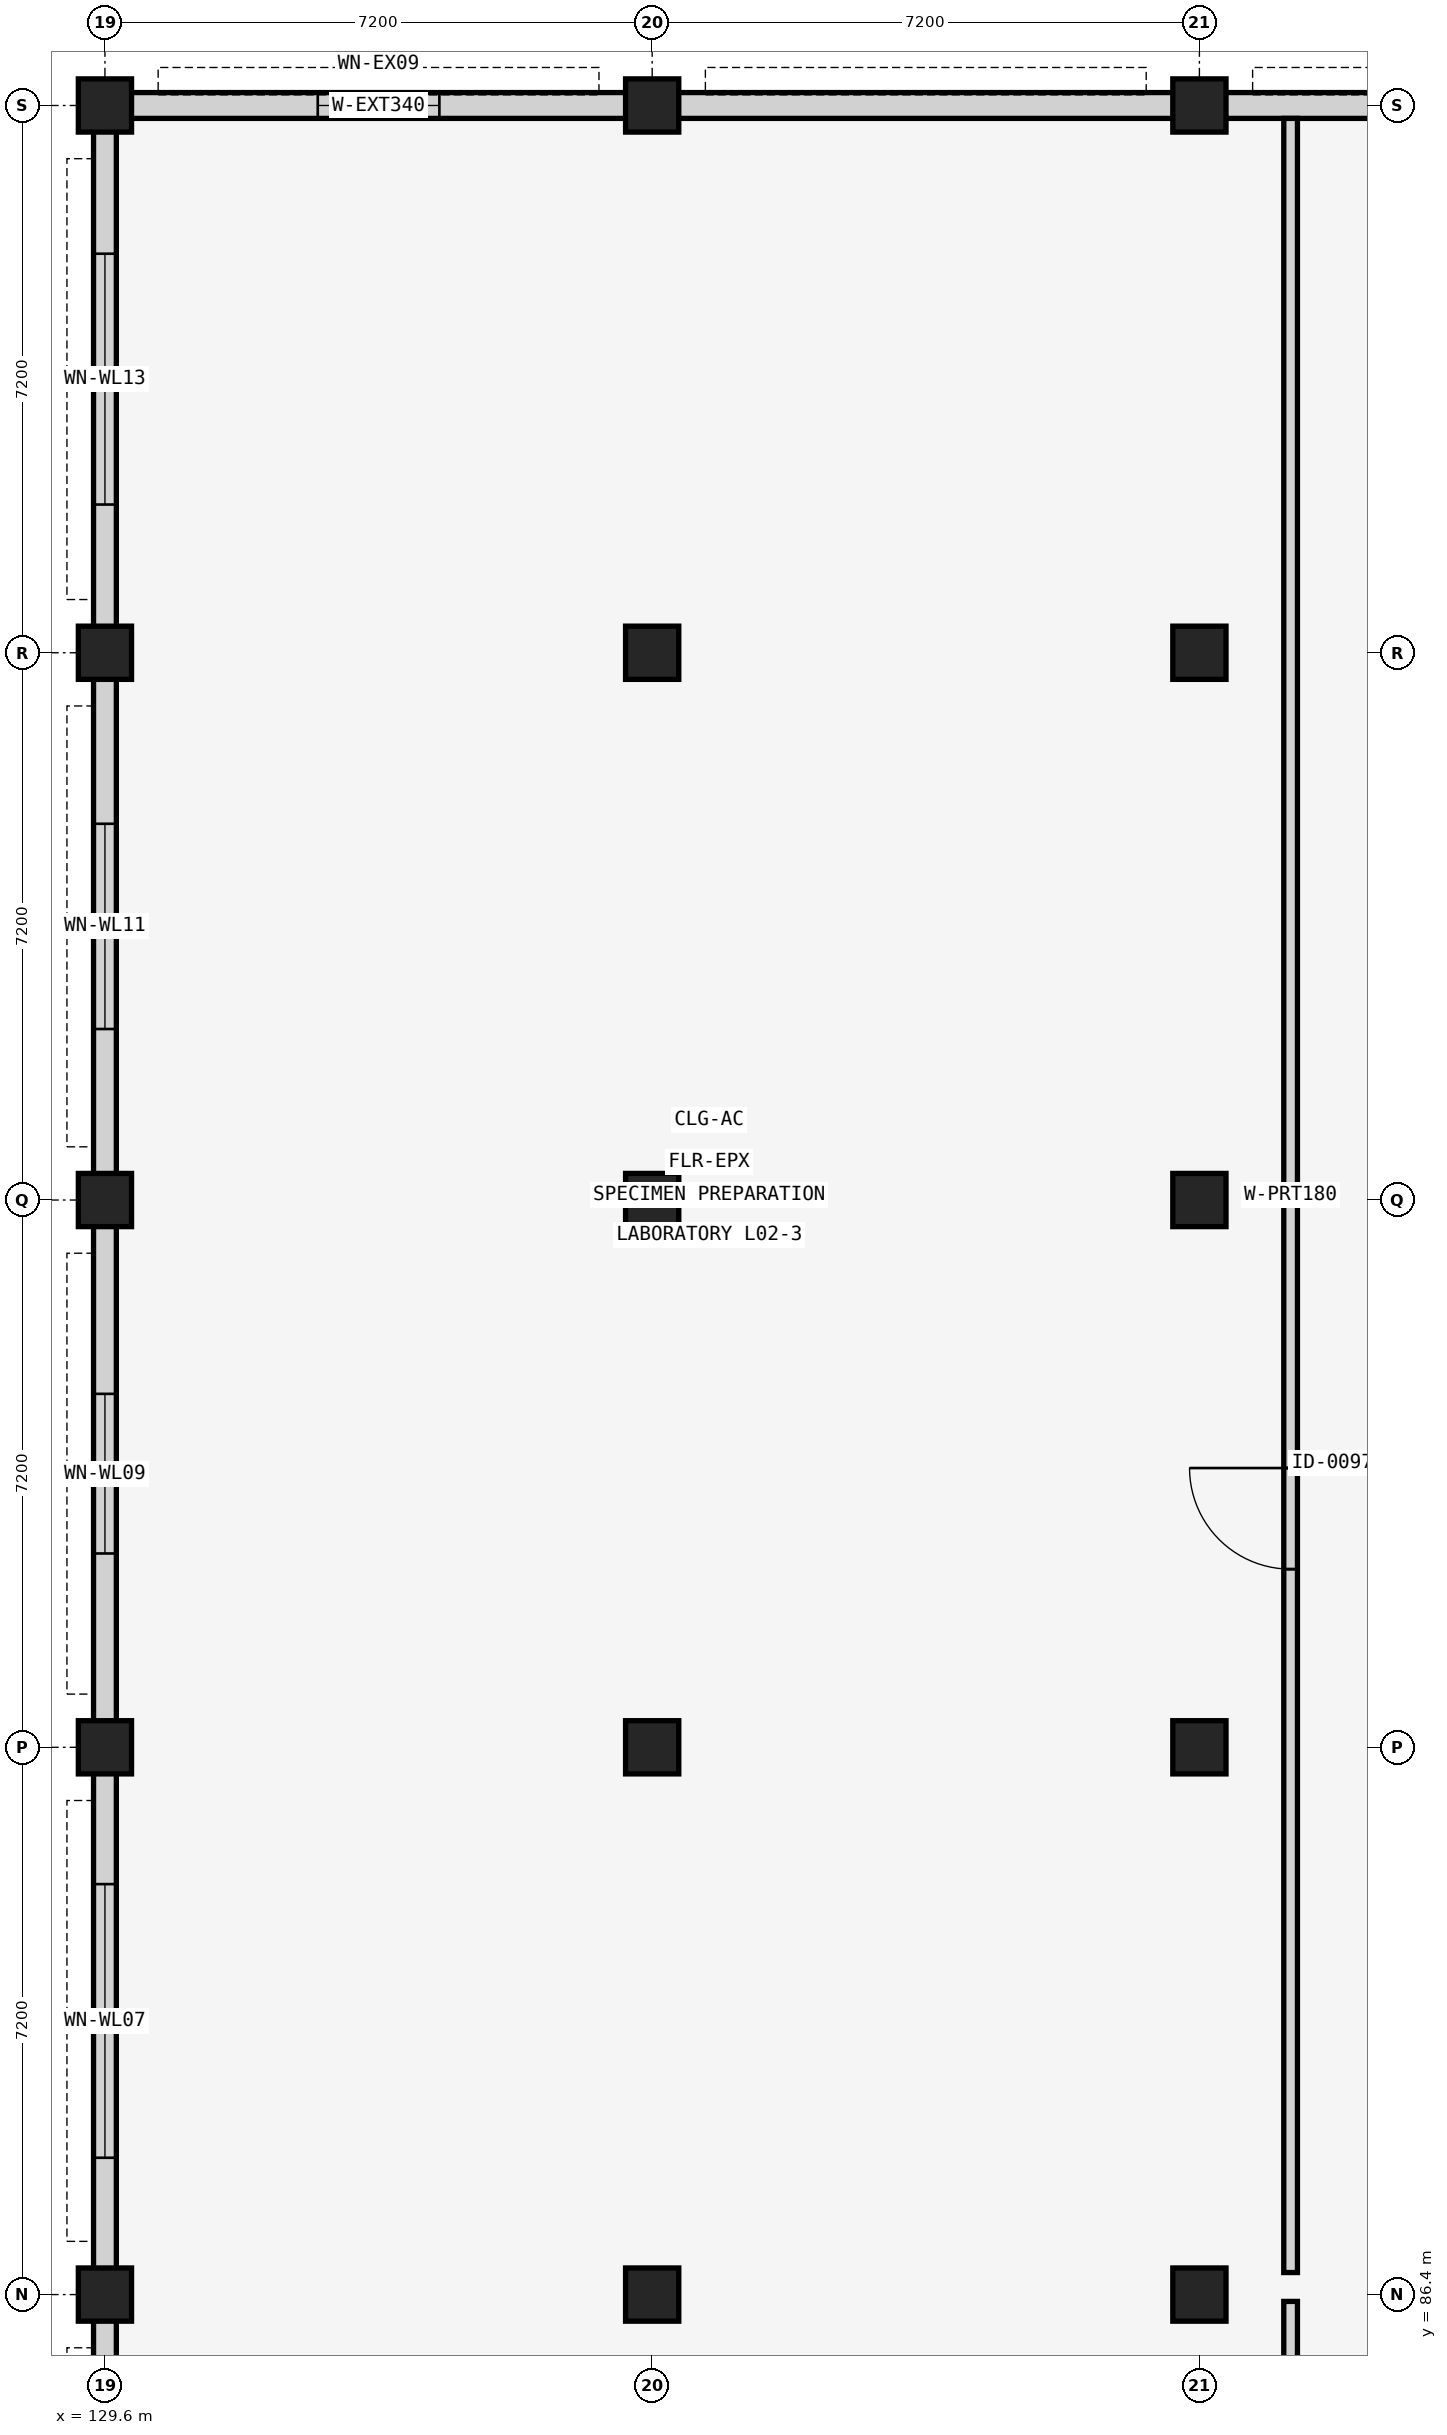
"""IFC4 building model, lengths in metres.
Left out: names, types, materials, properties, quantities, classifications, styles, units other than length and angle.
Written with IfcOpenShell. Run it as: python <this file> out.ifc"""

import sys

from ifc_helpers import new_model, si_unit, direction, frame, frame_2d, origin, origin_2d, place, context, subcontext, project, spatial, rectangle, extrude, element, fill, save


model = new_model("IFC4")
c1 = context("Model", 3, precision=1e-05, world=origin(), true_north=direction((0.0, 1.0)))
c2 = subcontext(c1, "Body", "Model", "MODEL_VIEW")
j1 = project(units=[si_unit("LENGTHUNIT", "METRE"), si_unit("PLANEANGLEUNIT", "RADIAN")], contexts=[c1])
p1 = place(None, origin())
s1 = spatial("IfcSite", under=j1, at=p1, CompositionType="ELEMENT")
p2 = place(p1, origin())
s2 = spatial("IfcBuilding", under=s1, at=p2, CompositionType="ELEMENT")
p3 = place(p2, frame((0.0, 0.0, 8.96)))
s3 = spatial("IfcBuildingStorey", under=s2, at=p3, CompositionType="ELEMENT", Elevation=8.96)
for number, where, z_axis, x_axis in (
    (1, (129.6, 86.4, 0.0), (0.0, 0.0, 1.0), (1.0, 0.0, 0.0)),
    (2, (129.6, 93.6, 0.0), (0.0, 0.0, 1.0), (1.0, 0.0, 0.0)),
    (3, (129.6, 100.8, 0.0), (0.0, 0.0, 1.0), (1.0, 0.0, 0.0)),
    (4, (129.6, 108.0, 0.0), (0.0, 0.0, 1.0), (1.0, 0.0, 0.0)),
    (5, (129.6, 115.2, 0.0), (0.0, 0.0, 1.0), (1.0, 0.0, 0.0)),
    (6, (136.8, 86.4, 0.0), (0.0, 0.0, 1.0), (1.0, 0.0, 0.0)),
    (7, (136.8, 93.6, 0.0), (0.0, 0.0, 1.0), (1.0, 0.0, 0.0)),
    (8, (136.8, 100.8, 0.0), (0.0, 0.0, 1.0), (1.0, 0.0, 0.0)),
    (9, (136.8, 108.0, 0.0), (0.0, 0.0, 1.0), (1.0, 0.0, 0.0)),
    (10, (136.8, 115.2, 0.0), (0.0, 0.0, 1.0), (1.0, 0.0, 0.0)),
    (11, (144.0, 86.4, 0.0), (0.0, 0.0, 1.0), (1.0, 0.0, 0.0)),
    (12, (144.0, 93.6, 0.0), (0.0, 0.0, 1.0), (1.0, 0.0, 0.0)),
    (13, (144.0, 100.8, 0.0), (0.0, 0.0, 1.0), (1.0, 0.0, 0.0)),
    (14, (144.0, 108.0, 0.0), (0.0, 0.0, 1.0), (1.0, 0.0, 0.0)),
    (15, (144.0, 115.2, 0.0), (0.0, 0.0, 1.0), (1.0, 0.0, 0.0)),
):
    element("IfcColumn", number, at=place(p3, frame(where, z_axis=z_axis, x_axis=x_axis)), inside=s3, PredefinedType="COLUMN", context=c2, shape_type="SweptSolid", body=[
        extrude(rectangle(XDim=0.7, YDim=0.7, at=origin_2d()), origin(), (0.0, 0.0, 1.0), 4.16),
    ])
p4 = place(p3, frame((129.94, 115.2, 0.0), z_axis=(0.0, 0.0, 1.0), x_axis=(1.0, 0.0, 0.0)))
e16 = element("IfcWall", 16, at=p4, inside=s3, PredefinedType="SOLIDWALL", context=c2, shape_type="SweptSolid", body=[
    extrude(rectangle(XDim=6.52, YDim=0.34, at=frame_2d((3.26, 0.0))), origin(), (0.0, 0.0, 1.0), 3.21),
])
p5 = place(p4, frame((2.46, 0.0, 0.95)))
e17 = element("IfcOpeningElement", 17, at=p5, cuts=e16, PredefinedType="OPENING", context=c2, shape_type="SweptSolid", body=[
    extrude(rectangle(XDim=1.6, YDim=1.7, at=frame_2d((0.8, 0.85))), frame((0.0, 0.18, 0.0), z_axis=(0.0, -1.0, 0.0), x_axis=(1.0, 0.0, 0.0)), (0.0, 0.0, 1.0), 0.36),
])
p6 = place(p3, frame((137.14, 115.2, 0.0), z_axis=(0.0, 0.0, 1.0), x_axis=(1.0, 0.0, 0.0)))
e18 = element("IfcWall", 18, at=p6, inside=s3, PredefinedType="SOLIDWALL", context=c2, shape_type="SweptSolid", body=[
    extrude(rectangle(XDim=6.52, YDim=0.34, at=frame_2d((3.26, 0.0))), origin(), (0.0, 0.0, 1.0), 3.21),
])
p7 = place(p3, frame((144.34, 115.2, 0.0), z_axis=(0.0, 0.0, 1.0), x_axis=(1.0, 0.0, 0.0)))
e19 = element("IfcWall", 19, at=p7, inside=s3, PredefinedType="SOLIDWALL", context=c2, shape_type="SweptSolid", body=[
    extrude(rectangle(XDim=6.52, YDim=0.34, at=frame_2d((3.26, 0.0))), origin(), (0.0, 0.0, 1.0), 3.21),
])
p8 = place(p7, frame((2.31, 0.0, 0.95)))
e20 = element("IfcOpeningElement", 20, at=p8, cuts=e19, PredefinedType="OPENING", context=c2, shape_type="SweptSolid", body=[
    extrude(rectangle(XDim=1.9, YDim=1.7, at=frame_2d((0.95, 0.85))), frame((0.0, 0.18, 0.0), z_axis=(0.0, -1.0, 0.0), x_axis=(1.0, 0.0, 0.0)), (0.0, 0.0, 1.0), 0.36),
])
p9 = place(p3, frame((129.6, 79.54, 0.0), z_axis=(0.0, 0.0, 1.0), x_axis=(0.0, 1.0, 0.0)))
e21 = element("IfcWall", 21, at=p9, inside=s3, PredefinedType="SOLIDWALL", context=c2, shape_type="SweptSolid", body=[
    extrude(rectangle(XDim=6.52, YDim=0.3, at=frame_2d((3.26, 0.0))), origin(), (0.0, 0.0, 1.0), 3.21),
])
p10 = place(p9, frame((1.76, 0.0, 0.95)))
e22 = element("IfcOpeningElement", 22, at=p10, cuts=e21, PredefinedType="OPENING", context=c2, shape_type="SweptSolid", body=[
    extrude(rectangle(XDim=3.0, YDim=2.1, at=frame_2d((1.5, 1.05))), frame((0.0, 0.16, 0.0), z_axis=(0.0, -1.0, 0.0), x_axis=(1.0, 0.0, 0.0)), (0.0, 0.0, 1.0), 0.32),
])
p11 = place(p3, frame((129.6, 86.74, 0.0), z_axis=(0.0, 0.0, 1.0), x_axis=(0.0, 1.0, 0.0)))
e23 = element("IfcWall", 23, at=p11, inside=s3, PredefinedType="SOLIDWALL", context=c2, shape_type="SweptSolid", body=[
    extrude(rectangle(XDim=6.52, YDim=0.3, at=frame_2d((3.26, 0.0))), origin(), (0.0, 0.0, 1.0), 3.21),
])
p12 = place(p11, frame((1.46, 0.0, 0.95)))
e24 = element("IfcOpeningElement", 24, at=p12, cuts=e23, PredefinedType="OPENING", context=c2, shape_type="SweptSolid", body=[
    extrude(rectangle(XDim=3.6, YDim=2.1, at=frame_2d((1.8, 1.05))), frame((0.0, 0.16, 0.0), z_axis=(0.0, -1.0, 0.0), x_axis=(1.0, 0.0, 0.0)), (0.0, 0.0, 1.0), 0.32),
])
p13 = place(p3, frame((129.6, 93.94, 0.0), z_axis=(0.0, 0.0, 1.0), x_axis=(0.0, 1.0, 0.0)))
e25 = element("IfcWall", 25, at=p13, inside=s3, PredefinedType="SOLIDWALL", context=c2, shape_type="SweptSolid", body=[
    extrude(rectangle(XDim=6.52, YDim=0.3, at=frame_2d((3.26, 0.0))), origin(), (0.0, 0.0, 1.0), 3.21),
])
p14 = place(p13, frame((2.21, 0.0, 0.95)))
e26 = element("IfcOpeningElement", 26, at=p14, cuts=e25, PredefinedType="OPENING", context=c2, shape_type="SweptSolid", body=[
    extrude(rectangle(XDim=2.1, YDim=1.8, at=frame_2d((1.05, 0.9))), frame((0.0, 0.16, 0.0), z_axis=(0.0, -1.0, 0.0), x_axis=(1.0, 0.0, 0.0)), (0.0, 0.0, 1.0), 0.32),
])
p15 = place(p3, frame((129.6, 101.14, 0.0), z_axis=(0.0, 0.0, 1.0), x_axis=(0.0, 1.0, 0.0)))
e27 = element("IfcWall", 27, at=p15, inside=s3, PredefinedType="SOLIDWALL", context=c2, shape_type="SweptSolid", body=[
    extrude(rectangle(XDim=6.52, YDim=0.3, at=frame_2d((3.26, 0.0))), origin(), (0.0, 0.0, 1.0), 3.21),
])
p16 = place(p15, frame((1.91, 0.0, 0.95)))
e28 = element("IfcOpeningElement", 28, at=p16, cuts=e27, PredefinedType="OPENING", context=c2, shape_type="SweptSolid", body=[
    extrude(rectangle(XDim=2.7, YDim=1.8, at=frame_2d((1.35, 0.9))), frame((0.0, 0.16, 0.0), z_axis=(0.0, -1.0, 0.0), x_axis=(1.0, 0.0, 0.0)), (0.0, 0.0, 1.0), 0.32),
])
p17 = place(p3, frame((129.6, 108.34, 0.0), z_axis=(0.0, 0.0, 1.0), x_axis=(0.0, 1.0, 0.0)))
e29 = element("IfcWall", 29, at=p17, inside=s3, PredefinedType="SOLIDWALL", context=c2, shape_type="SweptSolid", body=[
    extrude(rectangle(XDim=6.52, YDim=0.3, at=frame_2d((3.26, 0.0))), origin(), (0.0, 0.0, 1.0), 3.21),
])
p18 = place(p17, frame((1.61, 0.0, 0.95)))
e30 = element("IfcOpeningElement", 30, at=p18, cuts=e29, PredefinedType="OPENING", context=c2, shape_type="SweptSolid", body=[
    extrude(rectangle(XDim=3.3, YDim=1.8, at=frame_2d((1.65, 0.9))), frame((0.0, 0.16, 0.0), z_axis=(0.0, -1.0, 0.0), x_axis=(1.0, 0.0, 0.0)), (0.0, 0.0, 1.0), 0.32),
])
p19 = place(p3, frame((145.2, 57.89, 0.0), z_axis=(0.0, 0.0, 1.0), x_axis=(0.0, 1.0, 0.0)))
e31 = element("IfcWall", 31, at=p19, inside=s3, PredefinedType="PARTITIONING", context=c2, shape_type="SweptSolid", body=[
    extrude(rectangle(XDim=28.42, YDim=0.18, at=frame_2d((14.21, 0.0))), origin(), (0.0, 0.0, 1.0), 3.16),
])
p20 = place(p19, frame((9.307, 0.0, 0.0)))
e32 = element("IfcOpeningElement", 32, at=p20, cuts=e31, PredefinedType="OPENING", context=c2, shape_type="SweptSolid", body=[
    extrude(rectangle(XDim=1.28, YDim=2.12, at=frame_2d((0.64, 1.06))), frame((0.0, 0.1, 0.0), z_axis=(0.0, -1.0, 0.0), x_axis=(1.0, 0.0, 0.0)), (0.0, 0.0, 1.0), 0.2),
])
p21 = place(p3, frame((145.2, 86.69, 0.0), z_axis=(0.0, 0.0, 1.0), x_axis=(0.0, 1.0, 0.0)))
e33 = element("IfcWall", 33, at=p21, inside=s3, PredefinedType="PARTITIONING", context=c2, shape_type="SweptSolid", body=[
    extrude(rectangle(XDim=28.34, YDim=0.18, at=frame_2d((14.17, 0.0))), origin(), (0.0, 0.0, 1.0), 3.16),
])
p22 = place(p21, frame((9.254, 0.0, 0.0)))
e34 = element("IfcOpeningElement", 34, at=p22, cuts=e33, PredefinedType="OPENING", context=c2, shape_type="SweptSolid", body=[
    extrude(rectangle(XDim=1.33, YDim=2.12, at=frame_2d((0.665, 1.06))), frame((0.0, 0.1, 0.0), z_axis=(0.0, -1.0, 0.0), x_axis=(1.0, 0.0, 0.0)), (0.0, 0.0, 1.0), 0.2),
])
p23 = place(p5, origin())
e35 = element("IfcWindow", 35, at=p23, inside=s3, PartitioningType="SINGLE_PANEL", PredefinedType="WINDOW", context=c2, shape_type="SweptSolid", body=[
    extrude(rectangle(XDim=1.6, YDim=1.7, at=frame_2d((0.8, 0.85))), frame((0.0, 0.03, 0.0), z_axis=(0.0, -1.0, 0.0), x_axis=(1.0, 0.0, 0.0)), (0.0, 0.0, 1.0), 0.06),
])
fill(e17, e35)
p24 = place(p12, origin())
e36 = element("IfcWindow", 36, at=p24, inside=s3, PartitioningType="SINGLE_PANEL", PredefinedType="WINDOW", context=c2, shape_type="SweptSolid", body=[
    extrude(rectangle(XDim=3.6, YDim=2.1, at=frame_2d((1.8, 1.05))), frame((0.0, 0.03, 0.0), z_axis=(0.0, -1.0, 0.0), x_axis=(1.0, 0.0, 0.0)), (0.0, 0.0, 1.0), 0.06),
])
fill(e24, e36)
p25 = place(p14, origin())
e37 = element("IfcWindow", 37, at=p25, inside=s3, PartitioningType="SINGLE_PANEL", PredefinedType="WINDOW", context=c2, shape_type="SweptSolid", body=[
    extrude(rectangle(XDim=2.1, YDim=1.8, at=frame_2d((1.05, 0.9))), frame((0.0, 0.03, 0.0), z_axis=(0.0, -1.0, 0.0), x_axis=(1.0, 0.0, 0.0)), (0.0, 0.0, 1.0), 0.06),
])
fill(e26, e37)
p26 = place(p16, origin())
e38 = element("IfcWindow", 38, at=p26, inside=s3, PartitioningType="SINGLE_PANEL", PredefinedType="WINDOW", context=c2, shape_type="SweptSolid", body=[
    extrude(rectangle(XDim=2.7, YDim=1.8, at=frame_2d((1.35, 0.9))), frame((0.0, 0.03, 0.0), z_axis=(0.0, -1.0, 0.0), x_axis=(1.0, 0.0, 0.0)), (0.0, 0.0, 1.0), 0.06),
])
fill(e28, e38)
p27 = place(p18, origin())
e39 = element("IfcWindow", 39, at=p27, inside=s3, PartitioningType="SINGLE_PANEL", PredefinedType="WINDOW", context=c2, shape_type="SweptSolid", body=[
    extrude(rectangle(XDim=3.3, YDim=1.8, at=frame_2d((1.65, 0.9))), frame((0.0, 0.03, 0.0), z_axis=(0.0, -1.0, 0.0), x_axis=(1.0, 0.0, 0.0)), (0.0, 0.0, 1.0), 0.06),
])
fill(e30, e39)
p28 = place(p22, origin())
e40 = element("IfcDoor", 40, at=p28, inside=s3, OperationType="SINGLE_SWING_RIGHT", PredefinedType="DOOR", context=c2, shape_type="SweptSolid", body=[
    extrude(rectangle(XDim=1.33, YDim=2.12, at=frame_2d((0.665, 1.06))), frame((0.0, 0.025, 0.0), z_axis=(0.0, -1.0, 0.0), x_axis=(1.0, 0.0, 0.0)), (0.0, 0.0, 1.0), 0.05),
])
fill(e34, e40)
save(model, sys.argv[1])
